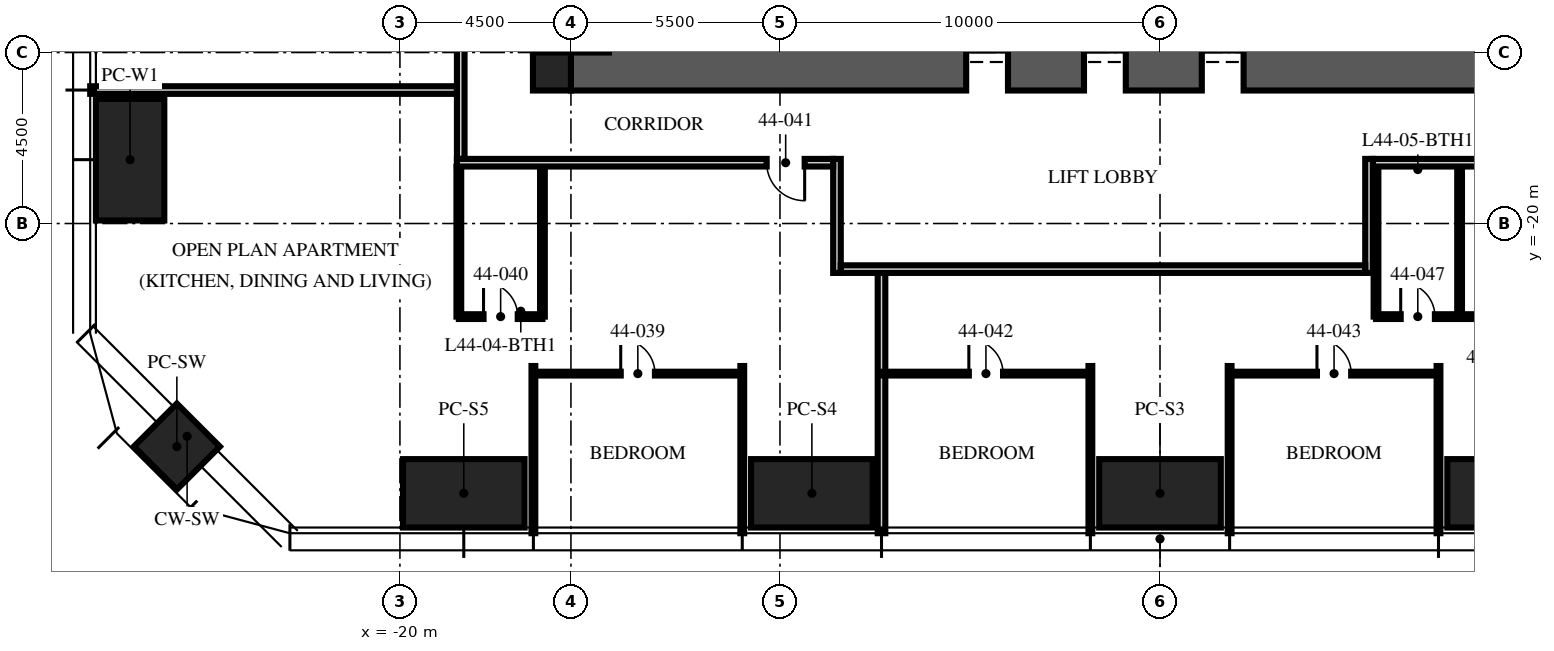
"""IFC4 building model, lengths in metres.
Left out: names, types, materials, properties, quantities, classifications, styles, units other than length and angle.
Written with IfcOpenShell. Run it as: python <this file> out.ifc"""

import sys

from ifc_helpers import new_model, si_unit, direction, frame, frame_2d, origin, origin_2d, place, context, subcontext, project, spatial, rectangle, hollow_rectangle, extrude, element, fill, save


model = new_model("IFC4")
c1 = context("Model", 3, precision=1e-05, world=origin(), true_north=direction((0.0, 1.0)))
c2 = subcontext(c1, "Body", "Model", "MODEL_VIEW")
j1 = project(units=[si_unit("LENGTHUNIT", "METRE"), si_unit("PLANEANGLEUNIT", "RADIAN")], contexts=[c1])
p1 = place(None, origin())
s1 = spatial("IfcSite", under=j1, at=p1, CompositionType="ELEMENT")
p2 = place(p1, origin())
s2 = spatial("IfcBuilding", under=s1, at=p2, CompositionType="ELEMENT")
p3 = place(p2, frame((0.0, 0.0, 174.75)))
s3 = spatial("IfcBuildingStorey", under=s2, at=p3, CompositionType="ELEMENT", Elevation=174.75)
p4 = place(p3, frame((-15.5, -15.5, -0.25), z_axis=(0.0, 0.0, 1.0), x_axis=(1.0, 0.0, 0.0)))
e1 = element("IfcWall", 1, at=p4, inside=s3, PredefinedType="SHEAR", context=c2, shape_type="SweptSolid", body=[
    extrude(rectangle(XDim=31.0, YDim=2.0, at=frame_2d((15.5, 0.0))), origin(), (0.0, 0.0, 1.0), 3.75),
])
p5 = place(p4, frame((10.4, 0.0, 0.25)))
e2 = element("IfcOpeningElement", 2, at=p5, cuts=e1, PredefinedType="OPENING", context=c2, shape_type="SweptSolid", body=[
    extrude(rectangle(XDim=1.1, YDim=2.1, at=frame_2d((0.55, 1.05))), frame((0.0, 1.01, 0.0), z_axis=(0.0, -1.0, 0.0), x_axis=(1.0, 0.0, 0.0)), (0.0, 0.0, 1.0), 2.02),
])
p6 = place(p4, frame((13.5, 0.0, 0.25)))
e3 = element("IfcOpeningElement", 3, at=p6, cuts=e1, PredefinedType="OPENING", context=c2, shape_type="SweptSolid", body=[
    extrude(rectangle(XDim=1.1, YDim=2.1, at=frame_2d((0.55, 1.05))), frame((0.0, 1.01, 0.0), z_axis=(0.0, -1.0, 0.0), x_axis=(1.0, 0.0, 0.0)), (0.0, 0.0, 1.0), 2.02),
])
p7 = place(p4, frame((16.6, 0.0, 0.25)))
e4 = element("IfcOpeningElement", 4, at=p7, cuts=e1, PredefinedType="OPENING", context=c2, shape_type="SweptSolid", body=[
    extrude(rectangle(XDim=1.1, YDim=2.1, at=frame_2d((0.55, 1.05))), frame((0.0, 1.01, 0.0), z_axis=(0.0, -1.0, 0.0), x_axis=(1.0, 0.0, 0.0)), (0.0, 0.0, 1.0), 2.02),
])
p8 = place(p3, frame((-16.0, -16.0, -0.25), z_axis=(0.0, 0.0, 1.0), x_axis=(1.0, 0.0, 0.0)))
e5 = element("IfcColumn", 5, at=p8, inside=s3, PredefinedType="COLUMN", context=c2, shape_type="SweptSolid", body=[
    extrude(rectangle(XDim=1.0, YDim=1.0, at=origin_2d()), origin(), (0.0, 0.0, 1.0), 3.75),
])
for number, where, z_axis, x_axis in (
    (6, (9.16, -27.1, 0.0), (0.0, 0.0, 1.0), (1.0, 0.0, 0.0)),
    (7, (0.0, -27.1, 0.0), (0.0, 0.0, 1.0), (1.0, 0.0, 0.0)),
    (8, (-9.16, -27.1, 0.0), (0.0, 0.0, 1.0), (1.0, 0.0, 0.0)),
    (9, (-18.32, -27.1, 0.0), (0.0, 0.0, 1.0), (1.0, 0.0, 0.0)),
    (10, (-27.1, -18.32, 0.0), (0.0, 0.0, 1.0), (0.0, 1.0, 0.0)),
):
    element("IfcColumn", number, at=place(p3, frame(where, z_axis=z_axis, x_axis=x_axis)), inside=s3, PredefinedType="COLUMN", context=c2, shape_type="SweptSolid", body=[
        extrude(hollow_rectangle(XDim=3.2, YDim=1.8, WallThickness=0.2, at=origin_2d()), origin(), (0.0, 0.0, 1.0), 3.75),
    ])
p9 = place(p3, frame((-25.87, -25.87, 0.0), z_axis=(0.0, 0.0, 1.0), x_axis=(0.707106781187, -0.707106781187, 0.0)))
e11 = element("IfcColumn", 11, at=p9, inside=s3, PredefinedType="COLUMN", context=c2, shape_type="SweptSolid", body=[
    extrude(hollow_rectangle(XDim=1.6, YDim=1.6, WallThickness=0.1, at=origin_2d()), origin(), (0.0, 0.0, 1.0), 3.75),
])
p10 = place(p3, frame((-18.5, -16.488, 0.0), z_axis=(0.0, 0.0, 1.0), x_axis=(-1.0, 0.0, 0.0)))
e12 = element("IfcWall", 12, at=p10, inside=s3, PredefinedType="PARTITIONING", context=c2, shape_type="SweptSolid", body=[
    extrude(rectangle(XDim=9.65, YDim=0.2, at=frame_2d((4.825, 0.0))), origin(), (0.0, 0.0, 1.0), 2.81),
])
for number, where, z_axis, x_axis in (
    (13, (-16.488, -23.75, 0.0), (0.0, 0.0, 1.0), (0.0, -1.0, 0.0)),
    (14, (-10.992, -23.75, 0.0), (0.0, 0.0, 1.0), (0.0, -1.0, 0.0)),
):
    element("IfcWall", number, at=place(p3, frame(where, z_axis=z_axis, x_axis=x_axis)), inside=s3, PredefinedType="PARTITIONING", context=c2, shape_type="SweptSolid", body=[
        extrude(rectangle(XDim=4.4, YDim=0.1, at=frame_2d((2.2, 0.0))), origin(), (0.0, 0.0, 1.0), 2.81),
    ])
p11 = place(p3, frame((-7.328, -21.3, 0.0), z_axis=(0.0, 0.0, 1.0), x_axis=(0.0, -1.0, 0.0)))
e15 = element("IfcWall", 15, at=p11, inside=s3, PredefinedType="PARTITIONING", context=c2, shape_type="SweptSolid", body=[
    extrude(rectangle(XDim=6.85, YDim=0.2, at=frame_2d((3.425, 0.0))), origin(), (0.0, 0.0, 1.0), 2.81),
])
for number, where, z_axis, x_axis in (
    (16, (-1.832, -23.75, 0.0), (0.0, 0.0, 1.0), (0.0, -1.0, 0.0)),
    (17, (1.832, -23.75, 0.0), (0.0, 0.0, 1.0), (0.0, -1.0, 0.0)),
    (18, (7.328, -23.75, 0.0), (0.0, 0.0, 1.0), (0.0, -1.0, 0.0)),
):
    element("IfcWall", number, at=place(p3, frame(where, z_axis=z_axis, x_axis=x_axis)), inside=s3, PredefinedType="PARTITIONING", context=c2, shape_type="SweptSolid", body=[
        extrude(rectangle(XDim=4.4, YDim=0.1, at=frame_2d((2.2, 0.0))), origin(), (0.0, 0.0, 1.0), 2.81),
    ])
p12 = place(p3, frame((-16.488, -23.95, 0.0), z_axis=(0.0, 0.0, 1.0), x_axis=(1.0, 0.0, 0.0)))
e19 = element("IfcWall", 19, at=p12, inside=s3, PredefinedType="PARTITIONING", context=c2, shape_type="SweptSolid", body=[
    extrude(rectangle(XDim=5.496, YDim=0.1, at=frame_2d((2.748, 0.0))), origin(), (0.0, 0.0, 1.0), 2.81),
])
p13 = place(p12, frame((2.298, 0.0, 0.0)))
e20 = element("IfcOpeningElement", 20, at=p13, cuts=e19, PredefinedType="OPENING", context=c2, shape_type="SweptSolid", body=[
    extrude(rectangle(XDim=0.9, YDim=2.1, at=frame_2d((0.45, 1.05))), frame((0.0, 0.06, 0.0), z_axis=(0.0, -1.0, 0.0), x_axis=(1.0, 0.0, 0.0)), (0.0, 0.0, 1.0), 0.12),
])
p14 = place(p3, frame((-18.45, -22.45, 0.0), z_axis=(0.0, 0.0, 1.0), x_axis=(1.0, 0.0, 0.0)))
e21 = element("IfcWall", 21, at=p14, inside=s3, PredefinedType="PARTITIONING", context=c2, shape_type="SweptSolid", body=[
    extrude(rectangle(XDim=2.2, YDim=0.125, at=frame_2d((1.1, 0.0))), origin(), (0.0, 0.0, 1.0), 2.7),
])
p15 = place(p14, frame((0.65, 0.0, 0.0)))
e22 = element("IfcOpeningElement", 22, at=p15, cuts=e21, PredefinedType="OPENING", context=c2, shape_type="SweptSolid", body=[
    extrude(rectangle(XDim=0.9, YDim=2.1, at=frame_2d((0.45, 1.05))), frame((0.0, 0.073, 0.0), z_axis=(0.0, -1.0, 0.0), x_axis=(1.0, 0.0, 0.0)), (0.0, 0.0, 1.0), 0.145),
])
p16 = place(p3, frame((-18.45, -18.5, 0.0), z_axis=(0.0, 0.0, 1.0), x_axis=(0.0, -1.0, 0.0)))
e23 = element("IfcWall", 23, at=p16, inside=s3, PredefinedType="PARTITIONING", context=c2, shape_type="SweptSolid", body=[
    extrude(rectangle(XDim=3.95, YDim=0.125, at=frame_2d((1.975, 0.0))), origin(), (0.0, 0.0, 1.0), 2.3),
])
p17 = place(p3, frame((-16.25, -18.5, 0.0), z_axis=(0.0, 0.0, 1.0), x_axis=(0.0, -1.0, 0.0)))
e24 = element("IfcWall", 24, at=p17, inside=s3, PredefinedType="PARTITIONING", context=c2, shape_type="SweptSolid", body=[
    extrude(rectangle(XDim=3.95, YDim=0.125, at=frame_2d((1.975, 0.0))), origin(), (0.0, 0.0, 1.0), 3.5),
])
p18 = place(p3, frame((-7.328, -23.95, 0.0), z_axis=(0.0, 0.0, 1.0), x_axis=(1.0, 0.0, 0.0)))
e25 = element("IfcWall", 25, at=p18, inside=s3, PredefinedType="PARTITIONING", context=c2, shape_type="SweptSolid", body=[
    extrude(rectangle(XDim=5.496, YDim=0.1, at=frame_2d((2.748, 0.0))), origin(), (0.0, 0.0, 1.0), 2.81),
])
p19 = place(p18, frame((2.298, 0.0, 0.0)))
e26 = element("IfcOpeningElement", 26, at=p19, cuts=e25, PredefinedType="OPENING", context=c2, shape_type="SweptSolid", body=[
    extrude(rectangle(XDim=0.9, YDim=2.1, at=frame_2d((0.45, 1.05))), frame((0.0, 0.06, 0.0), z_axis=(0.0, -1.0, 0.0), x_axis=(1.0, 0.0, 0.0)), (0.0, 0.0, 1.0), 0.12),
])
p20 = place(p3, frame((1.832, -23.95, 0.0), z_axis=(0.0, 0.0, 1.0), x_axis=(1.0, 0.0, 0.0)))
e27 = element("IfcWall", 27, at=p20, inside=s3, PredefinedType="PARTITIONING", context=c2, shape_type="SweptSolid", body=[
    extrude(rectangle(XDim=5.496, YDim=0.1, at=frame_2d((2.748, 0.0))), origin(), (0.0, 0.0, 1.0), 2.81),
])
p21 = place(p20, frame((2.298, 0.0, 0.0)))
e28 = element("IfcOpeningElement", 28, at=p21, cuts=e27, PredefinedType="OPENING", context=c2, shape_type="SweptSolid", body=[
    extrude(rectangle(XDim=0.9, YDim=2.1, at=frame_2d((0.45, 1.05))), frame((0.0, 0.06, 0.0), z_axis=(0.0, -1.0, 0.0), x_axis=(1.0, 0.0, 0.0)), (0.0, 0.0, 1.0), 0.12),
])
p22 = place(p3, frame((5.684, -22.45, 0.0), z_axis=(0.0, 0.0, 1.0), x_axis=(1.0, 0.0, 0.0)))
e29 = element("IfcWall", 29, at=p22, inside=s3, PredefinedType="PARTITIONING", context=c2, shape_type="SweptSolid", body=[
    extrude(rectangle(XDim=4.0, YDim=0.125, at=frame_2d((2.0, 0.0))), origin(), (0.0, 0.0, 1.0), 2.7),
])
p23 = place(p22, frame((0.65, 0.0, 0.0)))
e30 = element("IfcOpeningElement", 30, at=p23, cuts=e29, PredefinedType="OPENING", context=c2, shape_type="SweptSolid", body=[
    extrude(rectangle(XDim=0.9, YDim=2.1, at=frame_2d((0.45, 1.05))), frame((0.0, 0.073, 0.0), z_axis=(0.0, -1.0, 0.0), x_axis=(1.0, 0.0, 0.0)), (0.0, 0.0, 1.0), 0.145),
])
p24 = place(p22, frame((2.65, 0.0, 0.0)))
e31 = element("IfcOpeningElement", 31, at=p24, cuts=e29, PredefinedType="OPENING", context=c2, shape_type="SweptSolid", body=[
    extrude(rectangle(XDim=0.9, YDim=2.1, at=frame_2d((0.45, 1.05))), frame((0.0, 0.073, 0.0), z_axis=(0.0, -1.0, 0.0), x_axis=(1.0, 0.0, 0.0)), (0.0, 0.0, 1.0), 0.145),
])
for number, where, z_axis, x_axis in (
    (32, (5.684, -18.5, 0.0), (0.0, 0.0, 1.0), (0.0, -1.0, 0.0)),
    (33, (7.884, -18.5, 0.0), (0.0, 0.0, 1.0), (0.0, -1.0, 0.0)),
):
    element("IfcWall", number, at=place(p3, frame(where, z_axis=z_axis, x_axis=x_axis)), inside=s3, PredefinedType="PARTITIONING", context=c2, shape_type="SweptSolid", body=[
        extrude(rectangle(XDim=3.95, YDim=0.125, at=frame_2d((1.975, 0.0))), origin(), (0.0, 0.0, 1.0), 3.5),
    ])
p25 = place(p3, frame((-18.4, 5.328, 0.0), z_axis=(0.0, 0.0, 1.0), x_axis=(0.0, -1.0, 0.0)))
e34 = element("IfcWall", 34, at=p25, inside=s3, PredefinedType="PARTITIONING", context=c2, shape_type="SweptSolid", body=[
    extrude(rectangle(XDim=23.628, YDim=0.2, at=frame_2d((11.814, 0.0))), origin(), (0.0, 0.0, 1.0), 2.3),
])
p26 = place(p3, frame((18.5, -18.4, 0.0), z_axis=(0.0, 0.0, 1.0), x_axis=(-1.0, 0.0, 0.0)))
e35 = element("IfcWall", 35, at=p26, inside=s3, PredefinedType="PARTITIONING", context=c2, shape_type="SweptSolid", body=[
    extrude(rectangle(XDim=12.9, YDim=0.2, at=frame_2d((6.45, 0.0))), origin(), (0.0, 0.0, 1.0), 2.3),
])
for number, where, z_axis, x_axis in (
    (36, (5.5, -18.3, 0.0), (0.0, 0.0, 1.0), (0.0, -1.0, 0.0)),
    (37, (-8.5, -18.3, 0.0), (0.0, 0.0, 1.0), (0.0, -1.0, 0.0)),
):
    element("IfcWall", number, at=place(p3, frame(where, z_axis=z_axis, x_axis=x_axis)), inside=s3, PredefinedType="PARTITIONING", context=c2, shape_type="SweptSolid", body=[
        extrude(rectangle(XDim=3.0, YDim=0.2, at=frame_2d((1.5, 0.0))), origin(), (0.0, 0.0, 1.0), 3.5),
    ])
p27 = place(p3, frame((5.4, -21.2, 0.0), z_axis=(0.0, 0.0, 1.0), x_axis=(-1.0, 0.0, 0.0)))
e38 = element("IfcWall", 38, at=p27, inside=s3, PredefinedType="PARTITIONING", context=c2, shape_type="SweptSolid", body=[
    extrude(rectangle(XDim=13.8, YDim=0.2, at=frame_2d((6.9, 0.0))), origin(), (0.0, 0.0, 1.0), 2.7),
])
p28 = place(p3, frame((-8.6, -18.4, 0.0), z_axis=(0.0, 0.0, 1.0), x_axis=(-1.0, 0.0, 0.0)))
e39 = element("IfcWall", 39, at=p28, inside=s3, PredefinedType="PARTITIONING", context=c2, shape_type="SweptSolid", body=[
    extrude(rectangle(XDim=9.9, YDim=0.2, at=frame_2d((4.95, 0.0))), origin(), (0.0, 0.0, 1.0), 2.3),
])
p29 = place(p28, frame((0.75, 0.0, 0.0)))
e40 = element("IfcOpeningElement", 40, at=p29, cuts=e39, PredefinedType="OPENING", context=c2, shape_type="SweptSolid", body=[
    extrude(rectangle(XDim=1.0, YDim=2.2, at=frame_2d((0.5, 1.1))), frame((0.0, 0.11, 0.0), z_axis=(0.0, -1.0, 0.0), x_axis=(1.0, 0.0, 0.0)), (0.0, 0.0, 1.0), 0.22),
])
p30 = place(p5, origin())
e41 = element("IfcDoor", 41, at=p30, inside=s3, OperationType="DOUBLE_DOOR_SLIDING", PredefinedType="DOOR", context=c2, shape_type="SweptSolid", body=[
    extrude(rectangle(XDim=1.1, YDim=2.1, at=frame_2d((0.55, 1.05))), frame((0.0, 0.025, 0.0), z_axis=(0.0, -1.0, 0.0), x_axis=(1.0, 0.0, 0.0)), (0.0, 0.0, 1.0), 0.05),
])
fill(e2, e41)
p31 = place(p6, origin())
e42 = element("IfcDoor", 42, at=p31, inside=s3, OperationType="DOUBLE_DOOR_SLIDING", PredefinedType="DOOR", context=c2, shape_type="SweptSolid", body=[
    extrude(rectangle(XDim=1.1, YDim=2.1, at=frame_2d((0.55, 1.05))), frame((0.0, 0.025, 0.0), z_axis=(0.0, -1.0, 0.0), x_axis=(1.0, 0.0, 0.0)), (0.0, 0.0, 1.0), 0.05),
])
fill(e3, e42)
p32 = place(p7, origin())
e43 = element("IfcDoor", 43, at=p32, inside=s3, OperationType="DOUBLE_DOOR_SLIDING", PredefinedType="DOOR", context=c2, shape_type="SweptSolid", body=[
    extrude(rectangle(XDim=1.1, YDim=2.1, at=frame_2d((0.55, 1.05))), frame((0.0, 0.025, 0.0), z_axis=(0.0, -1.0, 0.0), x_axis=(1.0, 0.0, 0.0)), (0.0, 0.0, 1.0), 0.05),
])
fill(e4, e43)
p33 = place(p13, origin())
e44 = element("IfcDoor", 44, at=p33, inside=s3, OperationType="SINGLE_SWING_LEFT", PredefinedType="DOOR", context=c2, shape_type="SweptSolid", body=[
    extrude(rectangle(XDim=0.9, YDim=2.1, at=frame_2d((0.45, 1.05))), frame((0.0, 0.025, 0.0), z_axis=(0.0, -1.0, 0.0), x_axis=(1.0, 0.0, 0.0)), (0.0, 0.0, 1.0), 0.05),
])
fill(e20, e44)
p34 = place(p15, origin())
e45 = element("IfcDoor", 45, at=p34, inside=s3, OperationType="SINGLE_SWING_LEFT", PredefinedType="DOOR", context=c2, shape_type="SweptSolid", body=[
    extrude(rectangle(XDim=0.9, YDim=2.1, at=frame_2d((0.45, 1.05))), frame((0.0, 0.025, 0.0), z_axis=(0.0, -1.0, 0.0), x_axis=(1.0, 0.0, 0.0)), (0.0, 0.0, 1.0), 0.05),
])
fill(e22, e45)
p35 = place(p29, origin())
e46 = element("IfcDoor", 46, at=p35, inside=s3, OperationType="SINGLE_SWING_LEFT", PredefinedType="DOOR", context=c2, shape_type="SweptSolid", body=[
    extrude(rectangle(XDim=1.0, YDim=2.2, at=frame_2d((0.5, 1.1))), frame((0.0, 0.025, 0.0), z_axis=(0.0, -1.0, 0.0), x_axis=(1.0, 0.0, 0.0)), (0.0, 0.0, 1.0), 0.05),
])
fill(e40, e46)
p36 = place(p19, origin())
e47 = element("IfcDoor", 47, at=p36, inside=s3, OperationType="SINGLE_SWING_LEFT", PredefinedType="DOOR", context=c2, shape_type="SweptSolid", body=[
    extrude(rectangle(XDim=0.9, YDim=2.1, at=frame_2d((0.45, 1.05))), frame((0.0, 0.025, 0.0), z_axis=(0.0, -1.0, 0.0), x_axis=(1.0, 0.0, 0.0)), (0.0, 0.0, 1.0), 0.05),
])
fill(e26, e47)
p37 = place(p21, origin())
e48 = element("IfcDoor", 48, at=p37, inside=s3, OperationType="SINGLE_SWING_LEFT", PredefinedType="DOOR", context=c2, shape_type="SweptSolid", body=[
    extrude(rectangle(XDim=0.9, YDim=2.1, at=frame_2d((0.45, 1.05))), frame((0.0, 0.025, 0.0), z_axis=(0.0, -1.0, 0.0), x_axis=(1.0, 0.0, 0.0)), (0.0, 0.0, 1.0), 0.05),
])
fill(e28, e48)
p38 = place(p23, origin())
e49 = element("IfcDoor", 49, at=p38, inside=s3, OperationType="SINGLE_SWING_LEFT", PredefinedType="DOOR", context=c2, shape_type="SweptSolid", body=[
    extrude(rectangle(XDim=0.9, YDim=2.1, at=frame_2d((0.45, 1.05))), frame((0.0, 0.025, 0.0), z_axis=(0.0, -1.0, 0.0), x_axis=(1.0, 0.0, 0.0)), (0.0, 0.0, 1.0), 0.05),
])
fill(e30, e49)
save(model, sys.argv[1])
